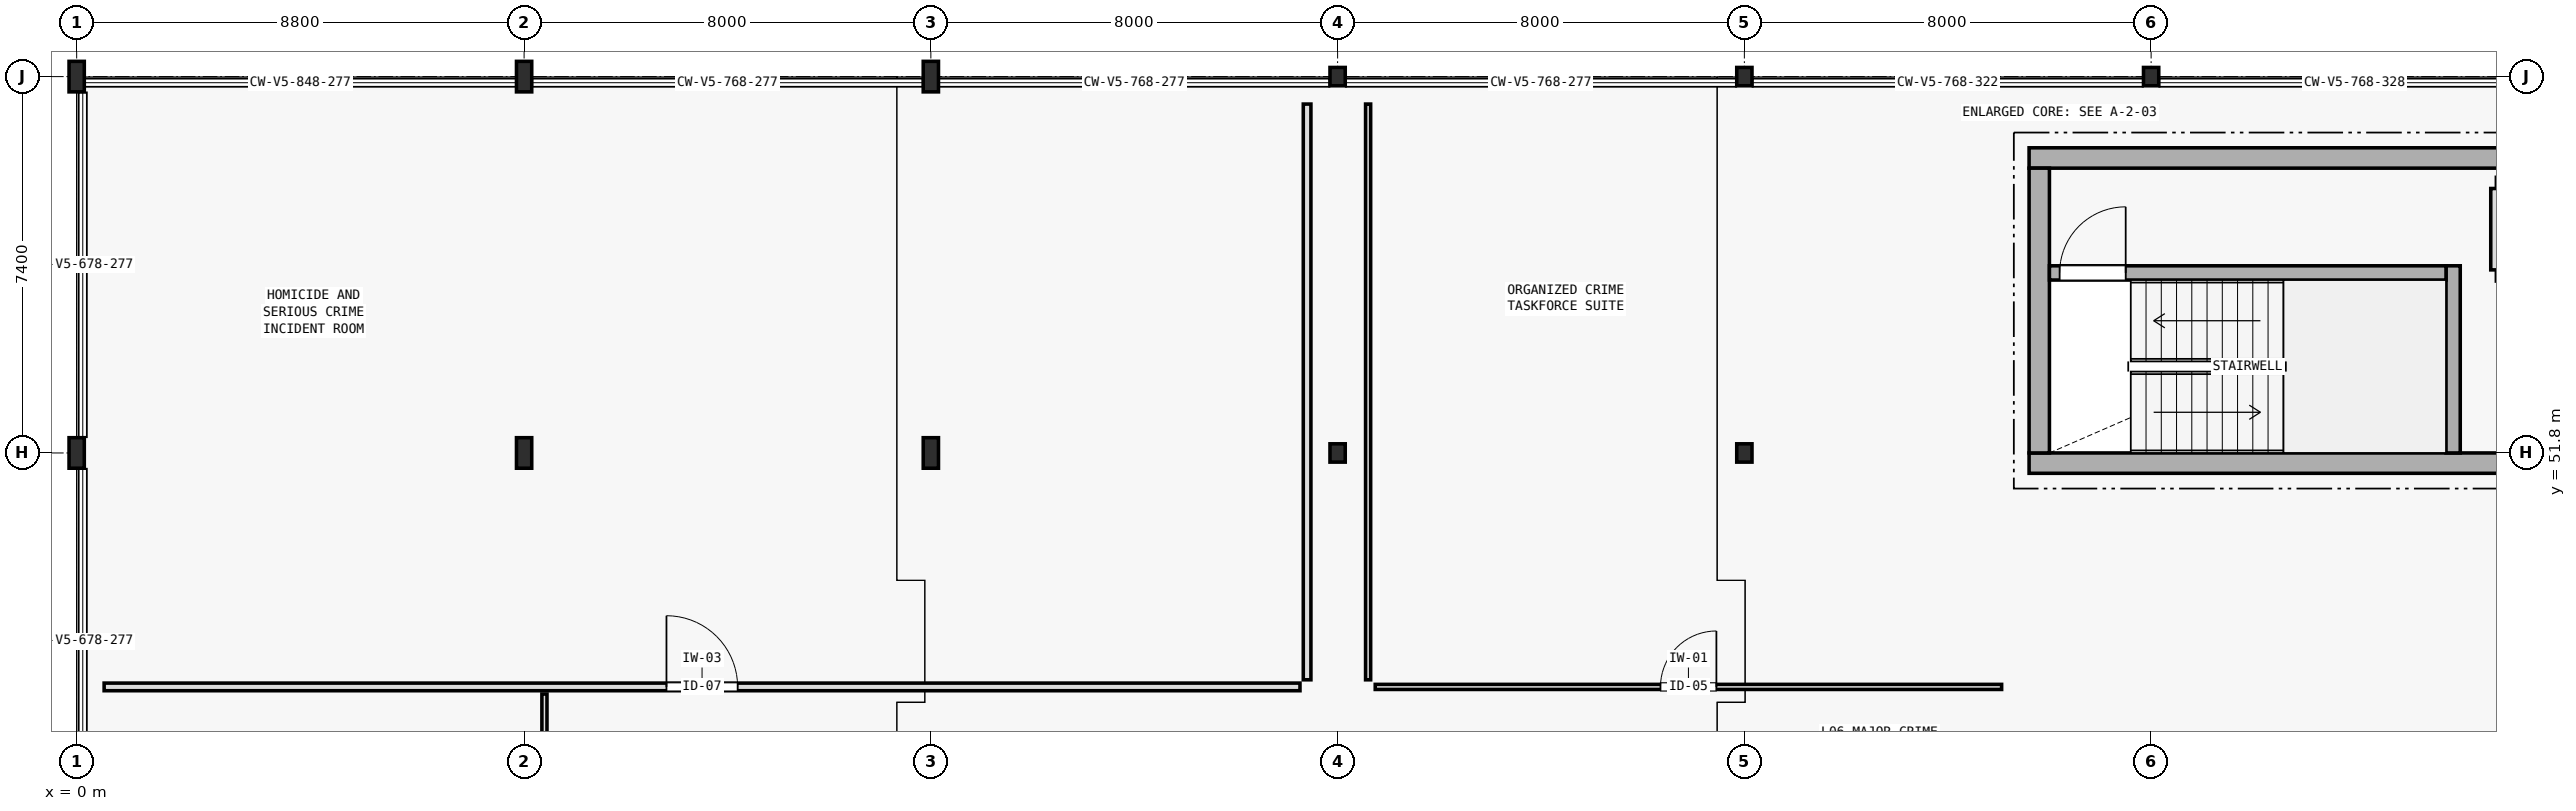
"""IFC4 building model, lengths in metres.
Left out: names, types, materials, properties, quantities, classifications, styles, units other than length and angle.
Written with IfcOpenShell. Run it as: python <this file> out.ifc"""

import sys

from ifc_helpers import new_model, si_unit, direction, frame, frame_2d, origin, origin_2d, place, context, subcontext, project, spatial, rectangle, i_section, extrude, element, fill, save


model = new_model("IFC4")
c1 = context("Model", 3, precision=1e-05, world=origin(), true_north=direction((0.0, 1.0)))
c2 = subcontext(c1, "Body", "Model", "MODEL_VIEW")
j1 = project(units=[si_unit("LENGTHUNIT", "METRE"), si_unit("PLANEANGLEUNIT", "RADIAN")], contexts=[c1])
p1 = place(None, origin())
s1 = spatial("IfcSite", under=j1, at=p1, CompositionType="ELEMENT")
p2 = place(p1, origin())
s2 = spatial("IfcBuilding", under=s1, at=p2, CompositionType="ELEMENT")
p3 = place(p2, frame((0.0, 0.0, 23.3)))
s3 = spatial("IfcBuildingStorey", under=s2, at=p3, CompositionType="ELEMENT", Elevation=23.3)
p4 = place(p3, frame((38.4, 51.6, 0.0), z_axis=(0.0, 0.0, 1.0), x_axis=(1.0, 0.0, 0.0)))
e1 = element("IfcWall", 1, at=p4, inside=s3, PredefinedType="SHEAR", context=c2, shape_type="SweptSolid", body=[
    extrude(rectangle(XDim=15.2, YDim=0.4, at=frame_2d((7.6, 0.0))), origin(), (0.0, 0.0, 1.0), 3.895),
])
p5 = place(p4, frame((10.25, 0.0, 0.0)))
e2 = element("IfcOpeningElement", 2, at=p5, cuts=e1, PredefinedType="OPENING", context=c2, shape_type="SweptSolid", body=[
    extrude(rectangle(XDim=1.3, YDim=2.2, at=frame_2d((0.65, 1.1))), frame((0.0, 0.21, 0.0), z_axis=(0.0, -1.0, 0.0), x_axis=(1.0, 0.0, 0.0)), (0.0, 0.0, 1.0), 0.42),
])
p6 = place(p3, frame((38.4, 57.6, 0.0), z_axis=(0.0, 0.0, 1.0), x_axis=(1.0, 0.0, 0.0)))
e3 = element("IfcWall", 3, at=p6, inside=s3, PredefinedType="SHEAR", context=c2, shape_type="SweptSolid", body=[
    extrude(rectangle(XDim=15.2, YDim=0.4, at=frame_2d((7.6, 0.0))), origin(), (0.0, 0.0, 1.0), 3.895),
])
p7 = place(p3, frame((38.6, 51.8, 0.0), z_axis=(0.0, 0.0, 1.0), x_axis=(0.0, 1.0, 0.0)))
e4 = element("IfcWall", 4, at=p7, inside=s3, PredefinedType="SHEAR", context=c2, shape_type="SweptSolid", body=[
    extrude(rectangle(XDim=5.6, YDim=0.4, at=frame_2d((2.8, 0.0))), origin(), (0.0, 0.0, 1.0), 3.895),
])
p8 = place(p3, frame((46.74, 51.8, 0.0), z_axis=(0.0, 0.0, 1.0), x_axis=(0.0, 1.0, 0.0)))
e5 = element("IfcWall", 5, at=p8, inside=s3, PredefinedType="SHEAR", context=c2, shape_type="SweptSolid", body=[
    extrude(rectangle(XDim=3.68, YDim=0.28, at=frame_2d((1.84, 0.0))), origin(), (0.0, 0.0, 1.0), 3.895),
])
p9 = place(p3, frame((38.8, 55.34, 0.0), z_axis=(0.0, 0.0, 1.0), x_axis=(1.0, 0.0, 0.0)))
e6 = element("IfcWall", 6, at=p9, inside=s3, PredefinedType="SHEAR", context=c2, shape_type="SweptSolid", body=[
    extrude(rectangle(XDim=7.8, YDim=0.28, at=frame_2d((3.9, 0.0))), origin(), (0.0, 0.0, 1.0), 3.895),
])
p10 = place(p9, frame((0.2, 0.0, 0.0)))
e7 = element("IfcOpeningElement", 7, at=p10, cuts=e6, PredefinedType="OPENING", context=c2, shape_type="SweptSolid", body=[
    extrude(rectangle(XDim=1.3, YDim=2.2, at=frame_2d((0.65, 1.1))), frame((0.0, 0.15, 0.0), z_axis=(0.0, -1.0, 0.0), x_axis=(1.0, 0.0, 0.0)), (0.0, 0.0, 1.0), 0.3),
])
for number, where, z_axis, x_axis in (
    (8, (0.0, 51.8, 0.0), (0.0, 0.0, 1.0), (1.0, 0.0, 0.0)),
    (9, (0.0, 59.2, 0.0), (0.0, 0.0, 1.0), (1.0, 0.0, 0.0)),
    (10, (8.8, 51.8, 0.0), (0.0, 0.0, 1.0), (1.0, 0.0, 0.0)),
    (11, (8.8, 59.2, 0.0), (0.0, 0.0, 1.0), (1.0, 0.0, 0.0)),
    (12, (16.8, 51.8, 0.0), (0.0, 0.0, 1.0), (1.0, 0.0, 0.0)),
    (13, (16.8, 59.2, 0.0), (0.0, 0.0, 1.0), (1.0, 0.0, 0.0)),
):
    element("IfcColumn", number, at=place(p3, frame(where, z_axis=z_axis, x_axis=x_axis)), inside=s3, PredefinedType="COLUMN", context=c2, shape_type="SweptSolid", body=[
        extrude(i_section(OverallWidth=0.3, OverallDepth=0.6, WebThickness=0.015, FlangeThickness=0.03, FilletRadius=0.027, at=origin_2d()), origin(), (0.0, 0.0, 1.0), 3.9),
    ])
for number, where, z_axis, x_axis in (
    (14, (24.8, 51.8, 0.0), (0.0, 0.0, 1.0), (1.0, 0.0, 0.0)),
    (15, (24.8, 59.2, 0.0), (0.0, 0.0, 1.0), (1.0, 0.0, 0.0)),
    (16, (32.8, 51.8, 0.0), (0.0, 0.0, 1.0), (1.0, 0.0, 0.0)),
    (17, (32.8, 59.2, 0.0), (0.0, 0.0, 1.0), (1.0, 0.0, 0.0)),
    (18, (40.8, 59.2, 0.0), (0.0, 0.0, 1.0), (1.0, 0.0, 0.0)),
):
    element("IfcColumn", number, at=place(p3, frame(where, z_axis=z_axis, x_axis=x_axis)), inside=s3, PredefinedType="COLUMN", context=c2, shape_type="SweptSolid", body=[
        extrude(i_section(OverallWidth=0.3, OverallDepth=0.36, WebThickness=0.012, FlangeThickness=0.022, FilletRadius=0.027, at=origin_2d()), origin(), (0.0, 0.0, 1.0), 3.9),
    ])
p11 = place(p3, frame((47.59, 55.29, 0.0), z_axis=(0.0, 0.0, 1.0), x_axis=(1.0, 0.0, 0.0)))
e19 = element("IfcWall", 19, at=p11, inside=s3, PredefinedType="PLUMBINGWALL", context=c2, shape_type="SweptSolid", body=[
    extrude(rectangle(XDim=1.62, YDim=0.22, at=frame_2d((0.81, 0.0))), origin(), (0.0, 0.0, 1.0), 3.68),
])
p12 = place(p11, frame((0.31, 0.0, 0.0)))
e20 = element("IfcOpeningElement", 20, at=p12, cuts=e19, PredefinedType="OPENING", context=c2, shape_type="SweptSolid", body=[
    extrude(rectangle(XDim=1.0, YDim=2.2, at=frame_2d((0.5, 1.1))), frame((0.0, 0.12, 0.0), z_axis=(0.0, -1.0, 0.0), x_axis=(1.0, 0.0, 0.0)), (0.0, 0.0, 1.0), 0.24),
])
p13 = place(p3, frame((47.59, 57.11, 0.0), z_axis=(0.0, 0.0, 1.0), x_axis=(1.0, 0.0, 0.0)))
e21 = element("IfcWall", 21, at=p13, inside=s3, PredefinedType="PLUMBINGWALL", context=c2, shape_type="SweptSolid", body=[
    extrude(rectangle(XDim=1.62, YDim=0.22, at=frame_2d((0.81, 0.0))), origin(), (0.0, 0.0, 1.0), 3.68),
])
p14 = place(p3, frame((47.59, 55.4, 0.0), z_axis=(0.0, 0.0, 1.0), x_axis=(0.0, 1.0, 0.0)))
e22 = element("IfcWall", 22, at=p14, inside=s3, PredefinedType="PLUMBINGWALL", context=c2, shape_type="SweptSolid", body=[
    extrude(rectangle(XDim=1.6, YDim=0.22, at=frame_2d((0.8, 0.0))), origin(), (0.0, 0.0, 1.0), 3.68),
])
p15 = place(p3, frame((0.54, 47.2, 0.0), z_axis=(0.0, 0.0, 1.0), x_axis=(1.0, 0.0, 0.0)))
e23 = element("IfcWall", 23, at=p15, inside=s3, PredefinedType="PARTITIONING", context=c2, shape_type="SweptSolid", body=[
    extrude(rectangle(XDim=23.52, YDim=0.15, at=frame_2d((11.76, 0.0))), origin(), (0.0, 0.0, 1.0), 3.21),
])
p16 = place(p15, frame((11.06, 0.0, 0.0)))
e24 = element("IfcOpeningElement", 24, at=p16, cuts=e23, PredefinedType="OPENING", context=c2, shape_type="SweptSolid", body=[
    extrude(rectangle(XDim=1.4, YDim=2.2, at=frame_2d((0.7, 1.1))), frame((0.0, 0.085, 0.0), z_axis=(0.0, -1.0, 0.0), x_axis=(1.0, 0.0, 0.0)), (0.0, 0.0, 1.0), 0.17),
])
p17 = place(p3, frame((24.2, 47.34, 0.0), z_axis=(0.0, 0.0, 1.0), x_axis=(0.0, 1.0, 0.0)))
e25 = element("IfcWall", 25, at=p17, inside=s3, PredefinedType="PARTITIONING", context=c2, shape_type="SweptSolid", body=[
    extrude(rectangle(XDim=11.32, YDim=0.15, at=frame_2d((5.66, 0.0))), origin(), (0.0, 0.0, 1.0), 2.76),
])
p18 = place(p3, frame((9.2, 37.54, 0.0), z_axis=(0.0, 0.0, 1.0), x_axis=(0.0, 1.0, 0.0)))
e26 = element("IfcWall", 26, at=p18, inside=s3, PredefinedType="PARTITIONING", context=c2, shape_type="SweptSolid", body=[
    extrude(rectangle(XDim=9.52, YDim=0.1, at=frame_2d((4.76, 0.0))), origin(), (0.0, 0.0, 1.0), 2.76),
])
p19 = place(p18, frame((4.26, 0.0, 0.0)))
e27 = element("IfcOpeningElement", 27, at=p19, cuts=e26, PredefinedType="OPENING", context=c2, shape_type="SweptSolid", body=[
    extrude(rectangle(XDim=1.0, YDim=2.2, at=frame_2d((0.5, 1.1))), frame((0.0, 0.06, 0.0), z_axis=(0.0, -1.0, 0.0), x_axis=(1.0, 0.0, 0.0)), (0.0, 0.0, 1.0), 0.12),
])
p20 = place(p3, frame((25.54, 47.2, 0.0), z_axis=(0.0, 0.0, 1.0), x_axis=(1.0, 0.0, 0.0)))
e28 = element("IfcWall", 28, at=p20, inside=s3, PredefinedType="PARTITIONING", context=c2, shape_type="SweptSolid", body=[
    extrude(rectangle(XDim=12.32, YDim=0.1, at=frame_2d((6.16, 0.0))), origin(), (0.0, 0.0, 1.0), 3.21),
])
p21 = place(p20, frame((5.61, 0.0, 0.0)))
e29 = element("IfcOpeningElement", 29, at=p21, cuts=e28, PredefinedType="OPENING", context=c2, shape_type="SweptSolid", body=[
    extrude(rectangle(XDim=1.1, YDim=2.2, at=frame_2d((0.55, 1.1))), frame((0.0, 0.06, 0.0), z_axis=(0.0, -1.0, 0.0), x_axis=(1.0, 0.0, 0.0)), (0.0, 0.0, 1.0), 0.12),
])
p22 = place(p3, frame((25.4, 47.34, 0.0), z_axis=(0.0, 0.0, 1.0), x_axis=(0.0, 1.0, 0.0)))
e30 = element("IfcWall", 30, at=p22, inside=s3, PredefinedType="PARTITIONING", context=c2, shape_type="SweptSolid", body=[
    extrude(rectangle(XDim=11.32, YDim=0.1, at=frame_2d((5.66, 0.0))), origin(), (0.0, 0.0, 1.0), 3.21),
])
p23 = place(p10, origin())
e31 = element("IfcDoor", 31, at=p23, inside=s3, OperationType="SINGLE_SWING_RIGHT", PredefinedType="DOOR", context=c2, shape_type="SweptSolid", body=[
    extrude(rectangle(XDim=1.3, YDim=2.2, at=frame_2d((0.65, 1.1))), frame((0.0, 0.025, 0.0), z_axis=(0.0, -1.0, 0.0), x_axis=(1.0, 0.0, 0.0)), (0.0, 0.0, 1.0), 0.05),
])
fill(e7, e31)
p24 = place(p16, origin())
e32 = element("IfcDoor", 32, at=p24, inside=s3, OperationType="SINGLE_SWING_LEFT", PredefinedType="DOOR", context=c2, shape_type="SweptSolid", body=[
    extrude(rectangle(XDim=1.4, YDim=2.2, at=frame_2d((0.7, 1.1))), frame((0.0, 0.025, 0.0), z_axis=(0.0, -1.0, 0.0), x_axis=(1.0, 0.0, 0.0)), (0.0, 0.0, 1.0), 0.05),
])
fill(e24, e32)
p25 = place(p21, origin())
e33 = element("IfcDoor", 33, at=p25, inside=s3, OperationType="SINGLE_SWING_RIGHT", PredefinedType="DOOR", context=c2, shape_type="SweptSolid", body=[
    extrude(rectangle(XDim=1.1, YDim=2.2, at=frame_2d((0.55, 1.1))), frame((0.0, 0.025, 0.0), z_axis=(0.0, -1.0, 0.0), x_axis=(1.0, 0.0, 0.0)), (0.0, 0.0, 1.0), 0.05),
])
fill(e29, e33)
save(model, sys.argv[1])
